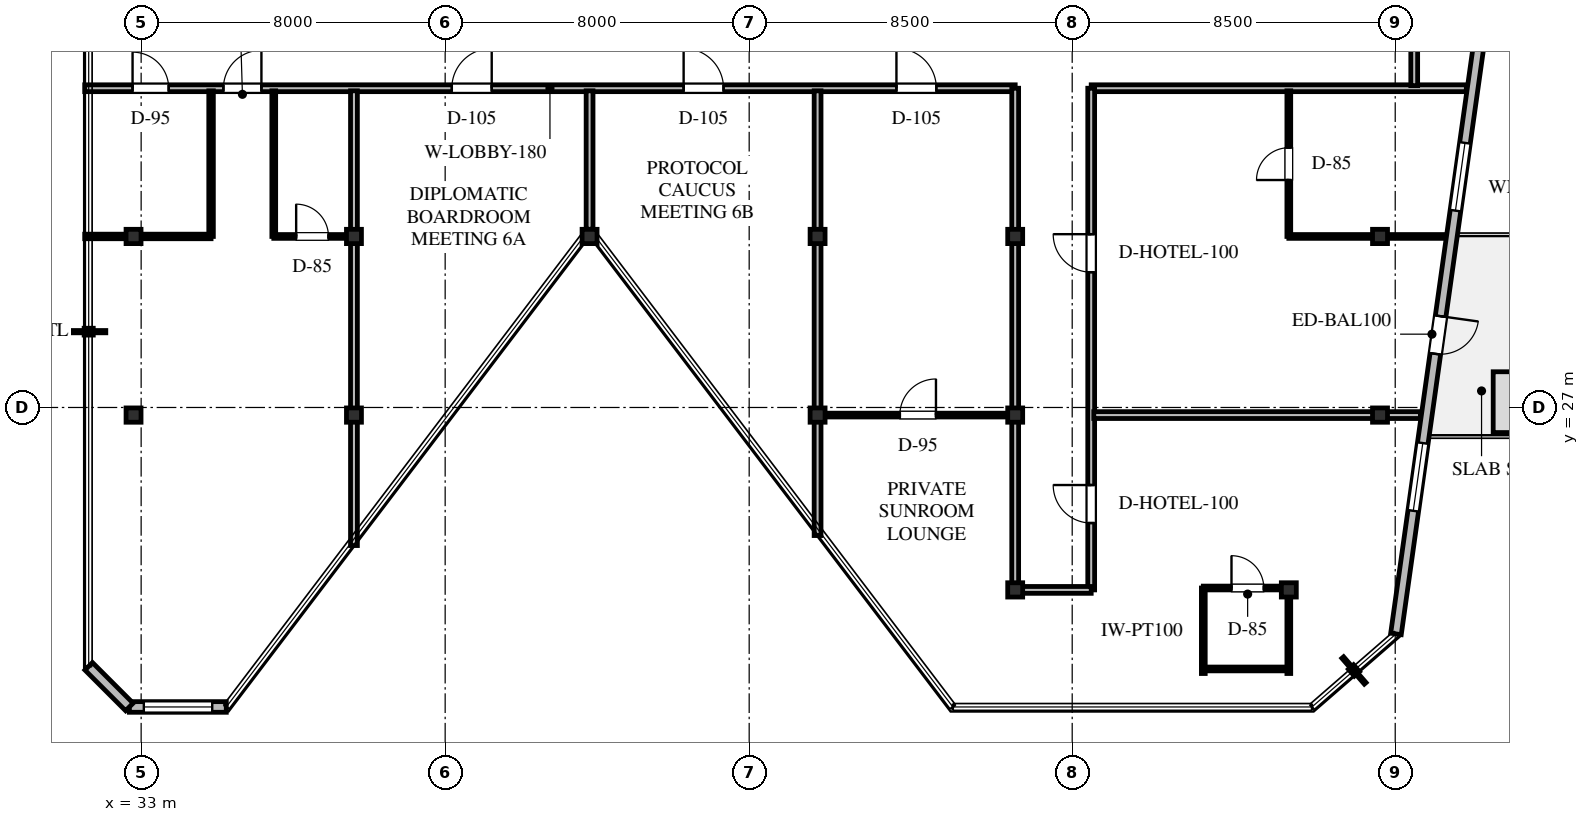
"""IFC4 building model, lengths in metres.
Left out: names, types, materials, properties, quantities, classifications, styles, units other than length and angle.
Written with IfcOpenShell. Run it as: python <this file> out.ifc"""

import sys

from ifc_helpers import new_model, si_unit, direction, frame, frame_2d, origin, origin_2d, place, context, subcontext, project, spatial, rectangle, i_section, extrude, element, fill, save


model = new_model("IFC4")
c1 = context("Model", 3, precision=1e-05, world=origin(), true_north=direction((0.0, 1.0)))
c2 = subcontext(c1, "Body", "Model", "MODEL_VIEW")
j1 = project(units=[si_unit("LENGTHUNIT", "METRE"), si_unit("PLANEANGLEUNIT", "RADIAN")], contexts=[c1])
p1 = place(None, origin())
s1 = spatial("IfcSite", under=j1, at=p1, CompositionType="ELEMENT")
p2 = place(p1, origin())
s2 = spatial("IfcBuilding", under=s1, at=p2, CompositionType="ELEMENT")
p3 = place(p2, frame((0.0, 0.0, 289.5)))
s3 = spatial("IfcBuildingStorey", under=s2, at=p3, CompositionType="ELEMENT", Elevation=289.5)
for number, where, z_axis, x_axis in (
    (1, (44.8, 31.5, 0.0), (0.0, 0.0, 1.0), (1.0, 0.0, 0.0)),
    (2, (50.8, 31.5, 0.0), (0.0, 0.0, 1.0), (1.0, 0.0, 0.0)),
    (3, (56.0, 31.5, 0.0), (0.0, 0.0, 1.0), (1.0, 0.0, 0.0)),
    (4, (65.6, 31.5, 0.0), (0.0, 0.0, 1.0), (1.0, 0.0, 0.0)),
    (5, (38.6, 31.5, 0.0), (0.0, 0.0, 1.0), (1.0, 0.0, 0.0)),
    (6, (32.8, 31.5, 0.0), (0.0, 0.0, 1.0), (1.0, 0.0, 0.0)),
    (7, (38.6, 26.8, 0.0), (0.0, 0.0, 1.0), (1.0, 0.0, 0.0)),
    (8, (50.8, 26.8, 0.0), (0.0, 0.0, 1.0), (1.0, 0.0, 0.0)),
    (9, (56.0, 26.8, 0.0), (0.0, 0.0, 1.0), (1.0, 0.0, 0.0)),
    (10, (65.6, 26.8, 0.0), (0.0, 0.0, 1.0), (1.0, 0.0, 0.0)),
    (11, (56.0, 22.2, 0.0), (0.0, 0.0, 1.0), (1.0, 0.0, 0.0)),
    (12, (63.2, 22.2, 0.0), (0.0, 0.0, 1.0), (1.0, 0.0, 0.0)),
    (13, (32.8, 26.8, 0.0), (0.0, 0.0, 1.0), (1.0, 0.0, 0.0)),
):
    element("IfcColumn", number, at=place(p3, frame(where, z_axis=z_axis, x_axis=x_axis)), inside=s3, PredefinedType="COLUMN", context=c2, shape_type="SweptSolid", body=[
        extrude(i_section(OverallWidth=0.394, OverallDepth=0.376, WebThickness=0.017, FlangeThickness=0.028, FilletRadius=0.03, at=origin_2d()), origin(), (0.0, 0.0, 1.0), 3.6),
    ])
p4 = place(p3, frame((68.375, 37.8, 0.0), z_axis=(0.0, 0.0, 1.0), x_axis=(-0.139171056495, -0.99026835607, 0.0)))
e14 = element("IfcWall", 14, at=p4, inside=s3, PredefinedType="STANDARD", context=c2, shape_type="SweptSolid", body=[
    extrude(rectangle(XDim=16.923, YDim=0.28, at=frame_2d((8.462, 0.0))), origin(), (0.0, 0.0, 1.0), 3.365),
])
p5 = place(p4, frame((8.481, 0.0, 0.0)))
e15 = element("IfcOpeningElement", 15, at=p5, cuts=e14, PredefinedType="OPENING", context=c2, shape_type="SweptSolid", body=[
    extrude(rectangle(XDim=1.0, YDim=2.15, at=frame_2d((0.5, 1.075))), frame((0.0, 0.15, 0.0), z_axis=(0.0, -1.0, 0.0), x_axis=(1.0, 0.0, 0.0)), (0.0, 0.0, 1.0), 0.3),
])
p6 = place(p4, frame((3.875, 0.0, 0.65)))
e16 = element("IfcOpeningElement", 16, at=p6, cuts=e14, PredefinedType="OPENING", context=c2, shape_type="SweptSolid", body=[
    extrude(rectangle(XDim=1.8, YDim=2.1, at=frame_2d((0.9, 1.05))), frame((0.0, 0.15, 0.0), z_axis=(0.0, -1.0, 0.0), x_axis=(1.0, 0.0, 0.0)), (0.0, 0.0, 1.0), 0.3),
])
p7 = place(p4, frame((11.852, 0.0, 0.65)))
e17 = element("IfcOpeningElement", 17, at=p7, cuts=e14, PredefinedType="OPENING", context=c2, shape_type="SweptSolid", body=[
    extrude(rectangle(XDim=1.8, YDim=2.1, at=frame_2d((0.9, 1.05))), frame((0.0, 0.15, 0.0), z_axis=(0.0, -1.0, 0.0), x_axis=(1.0, 0.0, 0.0)), (0.0, 0.0, 1.0), 0.3),
])
p8 = place(p3, frame((35.24, 19.12, 0.0), z_axis=(0.0, 0.0, 1.0), x_axis=(-1.0, 0.0, 0.0)))
e18 = element("IfcWall", 18, at=p8, inside=s3, PredefinedType="STANDARD", context=c2, shape_type="SweptSolid", body=[
    extrude(rectangle(XDim=2.551, YDim=0.28, at=frame_2d((1.275, 0.0))), origin(), (0.0, 0.0, 1.0), 3.365),
])
p9 = place(p8, frame((0.37, 0.0, 0.65)))
e19 = element("IfcOpeningElement", 19, at=p9, cuts=e18, PredefinedType="OPENING", context=c2, shape_type="SweptSolid", body=[
    extrude(rectangle(XDim=1.8, YDim=2.1, at=frame_2d((0.9, 1.05))), frame((0.0, 0.15, 0.0), z_axis=(0.0, -1.0, 0.0), x_axis=(1.0, 0.0, 0.0)), (0.0, 0.0, 1.0), 0.3),
])
p10 = place(p3, frame((32.69, 19.12, 0.0), z_axis=(0.0, 0.0, 1.0), x_axis=(-0.707106781187, 0.707106781187, 0.0)))
e20 = element("IfcWall", 20, at=p10, inside=s3, PredefinedType="STANDARD", context=c2, shape_type="SweptSolid", body=[
    extrude(rectangle(XDim=1.513, YDim=0.28, at=frame_2d((0.756, 0.0))), origin(), (0.0, 0.0, 1.0), 3.365),
])
p11 = place(p3, frame((31.515, 35.4, 0.0), z_axis=(0.0, 0.0, 1.0), x_axis=(1.0, 0.0, 0.0)))
e21 = element("IfcWall", 21, at=p11, inside=s3, PredefinedType="STANDARD", context=c2, shape_type="SweptSolid", body=[
    extrude(rectangle(XDim=24.485, YDim=0.18, at=frame_2d((12.243, 0.0))), origin(), (0.0, 0.0, 1.0), 2.754),
])
p12 = place(p11, frame((1.259, 0.0, 0.0)))
e22 = element("IfcOpeningElement", 22, at=p12, cuts=e21, PredefinedType="OPENING", context=c2, shape_type="SweptSolid", body=[
    extrude(rectangle(XDim=0.95, YDim=2.15, at=frame_2d((0.475, 1.075))), frame((0.0, 0.1, 0.0), z_axis=(0.0, -1.0, 0.0), x_axis=(1.0, 0.0, 0.0)), (0.0, 0.0, 1.0), 0.2),
])
p13 = place(p11, frame((3.65, 0.0, 0.0)))
e23 = element("IfcOpeningElement", 23, at=p13, cuts=e21, PredefinedType="OPENING", context=c2, shape_type="SweptSolid", body=[
    extrude(rectangle(XDim=1.0, YDim=2.15, at=frame_2d((0.5, 1.075))), frame((0.0, 0.1, 0.0), z_axis=(0.0, -1.0, 0.0), x_axis=(1.0, 0.0, 0.0)), (0.0, 0.0, 1.0), 0.2),
])
p14 = place(p11, frame((9.66, 0.0, 0.0)))
e24 = element("IfcOpeningElement", 24, at=p14, cuts=e21, PredefinedType="OPENING", context=c2, shape_type="SweptSolid", body=[
    extrude(rectangle(XDim=1.05, YDim=2.2, at=frame_2d((0.525, 1.1))), frame((0.0, 0.1, 0.0), z_axis=(0.0, -1.0, 0.0), x_axis=(1.0, 0.0, 0.0)), (0.0, 0.0, 1.0), 0.2),
])
p15 = place(p11, frame((15.76, 0.0, 0.0)))
e25 = element("IfcOpeningElement", 25, at=p15, cuts=e21, PredefinedType="OPENING", context=c2, shape_type="SweptSolid", body=[
    extrude(rectangle(XDim=1.05, YDim=2.2, at=frame_2d((0.525, 1.1))), frame((0.0, 0.1, 0.0), z_axis=(0.0, -1.0, 0.0), x_axis=(1.0, 0.0, 0.0)), (0.0, 0.0, 1.0), 0.2),
])
p16 = place(p11, frame((21.36, 0.0, 0.0)))
e26 = element("IfcOpeningElement", 26, at=p16, cuts=e21, PredefinedType="OPENING", context=c2, shape_type="SweptSolid", body=[
    extrude(rectangle(XDim=1.05, YDim=2.2, at=frame_2d((0.525, 1.1))), frame((0.0, 0.1, 0.0), z_axis=(0.0, -1.0, 0.0), x_axis=(1.0, 0.0, 0.0)), (0.0, 0.0, 1.0), 0.2),
])
p17 = place(p3, frame((58.0, 35.4, 0.0), z_axis=(0.0, 0.0, 1.0), x_axis=(1.0, 0.0, 0.0)))
e27 = element("IfcWall", 27, at=p17, inside=s3, PredefinedType="STANDARD", context=c2, shape_type="SweptSolid", body=[
    extrude(rectangle(XDim=9.871, YDim=0.18, at=frame_2d((4.936, 0.0))), origin(), (0.0, 0.0, 1.0), 3.365),
])
p18 = place(p3, frame((66.5, 35.468, 0.0), z_axis=(0.0, 0.0, 1.0), x_axis=(0.0, 1.0, 0.0)))
e28 = element("IfcWall", 28, at=p18, inside=s3, PredefinedType="STANDARD", context=c2, shape_type="SweptSolid", body=[
    extrude(rectangle(XDim=2.582, YDim=0.18, at=frame_2d((1.291, 0.0))), origin(), (0.0, 0.0, 1.0), 2.754),
])
p19 = place(p3, frame((56.0, 22.2, 0.0), z_axis=(0.0, 0.0, 1.0), x_axis=(0.0, 1.0, 0.0)))
e29 = element("IfcWall", 29, at=p19, inside=s3, PredefinedType="STANDARD", context=c2, shape_type="SweptSolid", body=[
    extrude(rectangle(XDim=13.2, YDim=0.18, at=frame_2d((6.6, 0.0))), origin(), (0.0, 0.0, 1.0), 2.754),
])
p20 = place(p3, frame((58.0, 22.2, 0.0), z_axis=(0.0, 0.0, 1.0), x_axis=(0.0, 1.0, 0.0)))
e30 = element("IfcWall", 30, at=p20, inside=s3, PredefinedType="STANDARD", context=c2, shape_type="SweptSolid", body=[
    extrude(rectangle(XDim=13.2, YDim=0.18, at=frame_2d((6.6, 0.0))), origin(), (0.0, 0.0, 1.0), 2.754),
])
p21 = place(p20, frame((1.76, 0.0, 0.0)))
e31 = element("IfcOpeningElement", 31, at=p21, cuts=e30, PredefinedType="OPENING", context=c2, shape_type="SweptSolid", body=[
    extrude(rectangle(XDim=1.0, YDim=2.15, at=frame_2d((0.5, 1.075))), frame((0.0, 0.1, 0.0), z_axis=(0.0, -1.0, 0.0), x_axis=(1.0, 0.0, 0.0)), (0.0, 0.0, 1.0), 0.2),
])
p22 = place(p20, frame((8.36, 0.0, 0.0)))
e32 = element("IfcOpeningElement", 32, at=p22, cuts=e30, PredefinedType="OPENING", context=c2, shape_type="SweptSolid", body=[
    extrude(rectangle(XDim=1.0, YDim=2.15, at=frame_2d((0.5, 1.075))), frame((0.0, 0.1, 0.0), z_axis=(0.0, -1.0, 0.0), x_axis=(1.0, 0.0, 0.0)), (0.0, 0.0, 1.0), 0.2),
])
p23 = place(p3, frame((56.0, 22.2, 0.0), z_axis=(0.0, 0.0, 1.0), x_axis=(1.0, 0.0, 0.0)))
e33 = element("IfcWall", 33, at=p23, inside=s3, PredefinedType="STANDARD", context=c2, shape_type="SweptSolid", body=[
    extrude(rectangle(XDim=2.0, YDim=0.18, at=frame_2d((1.0, 0.0))), origin(), (0.0, 0.0, 1.0), 2.754),
])
p24 = place(p3, frame((34.84, 31.5, 0.0), z_axis=(0.0, 0.0, 1.0), x_axis=(0.0, 1.0, 0.0)))
e34 = element("IfcWall", 34, at=p24, inside=s3, PredefinedType="PARTITIONING", context=c2, shape_type="SweptSolid", body=[
    extrude(rectangle(XDim=3.832, YDim=0.12, at=frame_2d((1.916, 0.0))), origin(), (0.0, 0.0, 1.0), 2.754),
])
p25 = place(p3, frame((31.515, 31.5, 0.0), z_axis=(0.0, 0.0, 1.0), x_axis=(1.0, 0.0, 0.0)))
e35 = element("IfcWall", 35, at=p25, inside=s3, PredefinedType="PARTITIONING", context=c2, shape_type="SweptSolid", body=[
    extrude(rectangle(XDim=3.325, YDim=0.12, at=frame_2d((1.663, 0.0))), origin(), (0.0, 0.0, 1.0), 2.754),
])
p26 = place(p3, frame((58.068, 26.8, 0.0), z_axis=(0.0, 0.0, 1.0), x_axis=(1.0, 0.0, 0.0)))
e36 = element("IfcWall", 36, at=p26, inside=s3, PredefinedType="STANDARD", context=c2, shape_type="SweptSolid", body=[
    extrude(rectangle(XDim=8.594, YDim=0.18, at=frame_2d((4.297, 0.0))), origin(), (0.0, 0.0, 1.0), 2.754),
])
p27 = place(p3, frame((60.95, 22.25, 0.0), z_axis=(0.0, 0.0, 1.0), x_axis=(1.0, 0.0, 0.0)))
e37 = element("IfcWall", 37, at=p27, inside=s3, PredefinedType="PARTITIONING", context=c2, shape_type="SweptSolid", body=[
    extrude(rectangle(XDim=2.25, YDim=0.1, at=frame_2d((1.125, 0.0))), origin(), (0.0, 0.0, 1.0), 2.754),
])
p28 = place(p27, frame((0.741, 0.0, 0.0)))
e38 = element("IfcOpeningElement", 38, at=p28, cuts=e37, PredefinedType="OPENING", context=c2, shape_type="SweptSolid", body=[
    extrude(rectangle(XDim=0.85, YDim=2.1, at=frame_2d((0.425, 1.05))), frame((0.0, 0.06, 0.0), z_axis=(0.0, -1.0, 0.0), x_axis=(1.0, 0.0, 0.0)), (0.0, 0.0, 1.0), 0.12),
])
for number, where, z_axis, x_axis in (
    (39, (60.95, 20.0, 0.0), (0.0, 0.0, 1.0), (0.0, 1.0, 0.0)),
    (40, (63.2, 20.0, 0.0), (0.0, 0.0, 1.0), (0.0, 1.0, 0.0)),
):
    element("IfcWall", number, at=place(p3, frame(where, z_axis=z_axis, x_axis=x_axis)), inside=s3, PredefinedType="PARTITIONING", context=c2, shape_type="SweptSolid", body=[
        extrude(rectangle(XDim=2.25, YDim=0.1, at=frame_2d((1.125, 0.0))), origin(), (0.0, 0.0, 1.0), 2.754),
    ])
p29 = place(p3, frame((61.018, 20.12, 0.0), z_axis=(0.0, 0.0, 1.0), x_axis=(1.0, 0.0, 0.0)))
e41 = element("IfcWall", 41, at=p29, inside=s3, PredefinedType="PARTITIONING", context=c2, shape_type="SweptSolid", body=[
    extrude(rectangle(XDim=2.114, YDim=0.1, at=frame_2d((1.057, 0.0))), origin(), (0.0, 0.0, 1.0), 3.365),
])
p30 = place(p3, frame((63.2, 31.5, 0.0), z_axis=(0.0, 0.0, 1.0), x_axis=(1.0, 0.0, 0.0)))
e42 = element("IfcWall", 42, at=p30, inside=s3, PredefinedType="PARTITIONING", context=c2, shape_type="SweptSolid", body=[
    extrude(rectangle(XDim=4.123, YDim=0.1, at=frame_2d((2.062, 0.0))), origin(), (0.0, 0.0, 1.0), 2.754),
])
p31 = place(p3, frame((63.2, 31.5, 0.0), z_axis=(0.0, 0.0, 1.0), x_axis=(0.0, 1.0, 0.0)))
e43 = element("IfcWall", 43, at=p31, inside=s3, PredefinedType="PARTITIONING", context=c2, shape_type="SweptSolid", body=[
    extrude(rectangle(XDim=3.832, YDim=0.1, at=frame_2d((1.916, 0.0))), origin(), (0.0, 0.0, 1.0), 2.754),
])
p32 = place(p31, frame((1.485, 0.0, 0.0)))
e44 = element("IfcOpeningElement", 44, at=p32, cuts=e43, PredefinedType="OPENING", context=c2, shape_type="SweptSolid", body=[
    extrude(rectangle(XDim=0.85, YDim=2.1, at=frame_2d((0.425, 1.05))), frame((0.0, 0.06, 0.0), z_axis=(0.0, -1.0, 0.0), x_axis=(1.0, 0.0, 0.0)), (0.0, 0.0, 1.0), 0.12),
])
p33 = place(p3, frame((36.49, 31.5, 0.0), z_axis=(0.0, 0.0, 1.0), x_axis=(0.0, 1.0, 0.0)))
e45 = element("IfcWall", 45, at=p33, inside=s3, PredefinedType="PARTITIONING", context=c2, shape_type="SweptSolid", body=[
    extrude(rectangle(XDim=3.832, YDim=0.1, at=frame_2d((1.916, 0.0))), origin(), (0.0, 0.0, 1.0), 2.754),
])
p34 = place(p3, frame((36.49, 31.5, 0.0), z_axis=(0.0, 0.0, 1.0), x_axis=(1.0, 0.0, 0.0)))
e46 = element("IfcWall", 46, at=p34, inside=s3, PredefinedType="PARTITIONING", context=c2, shape_type="SweptSolid", body=[
    extrude(rectangle(XDim=2.042, YDim=0.1, at=frame_2d((1.021, 0.0))), origin(), (0.0, 0.0, 1.0), 2.754),
])
p35 = place(p34, frame((0.589, 0.0, 0.0)))
e47 = element("IfcOpeningElement", 47, at=p35, cuts=e46, PredefinedType="OPENING", context=c2, shape_type="SweptSolid", body=[
    extrude(rectangle(XDim=0.85, YDim=2.1, at=frame_2d((0.425, 1.05))), frame((0.0, 0.06, 0.0), z_axis=(0.0, -1.0, 0.0), x_axis=(1.0, 0.0, 0.0)), (0.0, 0.0, 1.0), 0.12),
])
p36 = place(p3, frame((38.6, 23.367, 0.0), z_axis=(0.0, 0.0, 1.0), x_axis=(0.0, 1.0, 0.0)))
e48 = element("IfcWall", 48, at=p36, inside=s3, PredefinedType="STANDARD", context=c2, shape_type="SweptSolid", body=[
    extrude(rectangle(XDim=11.965, YDim=0.18, at=frame_2d((5.982, 0.0))), origin(), (0.0, 0.0, 1.0), 2.754),
])
p37 = place(p3, frame((44.8, 31.525, 0.0), z_axis=(0.0, 0.0, 1.0), x_axis=(0.0, 1.0, 0.0)))
e49 = element("IfcWall", 49, at=p37, inside=s3, PredefinedType="STANDARD", context=c2, shape_type="SweptSolid", body=[
    extrude(rectangle(XDim=3.807, YDim=0.18, at=frame_2d((1.904, 0.0))), origin(), (0.0, 0.0, 1.0), 2.754),
])
p38 = place(p3, frame((50.8, 23.63, 0.0), z_axis=(0.0, 0.0, 1.0), x_axis=(0.0, 1.0, 0.0)))
e50 = element("IfcWall", 50, at=p38, inside=s3, PredefinedType="STANDARD", context=c2, shape_type="SweptSolid", body=[
    extrude(rectangle(XDim=11.702, YDim=0.18, at=frame_2d((5.851, 0.0))), origin(), (0.0, 0.0, 1.0), 2.754),
])
p39 = place(p3, frame((50.868, 26.8, 0.0), z_axis=(0.0, 0.0, 1.0), x_axis=(1.0, 0.0, 0.0)))
e51 = element("IfcWall", 51, at=p39, inside=s3, PredefinedType="PARTITIONING", context=c2, shape_type="SweptSolid", body=[
    extrude(rectangle(XDim=5.064, YDim=0.1, at=frame_2d((2.532, 0.0))), origin(), (0.0, 0.0, 1.0), 2.754),
])
p40 = place(p39, frame((2.097, 0.0, 0.0)))
e52 = element("IfcOpeningElement", 52, at=p40, cuts=e51, PredefinedType="OPENING", context=c2, shape_type="SweptSolid", body=[
    extrude(rectangle(XDim=0.95, YDim=2.15, at=frame_2d((0.475, 1.075))), frame((0.0, 0.06, 0.0), z_axis=(0.0, -1.0, 0.0), x_axis=(1.0, 0.0, 0.0)), (0.0, 0.0, 1.0), 0.12),
])
p41 = place(p5, origin())
e53 = element("IfcDoor", 53, at=p41, inside=s3, OperationType="SINGLE_SWING_LEFT", PredefinedType="DOOR", context=c2, shape_type="SweptSolid", body=[
    extrude(rectangle(XDim=1.0, YDim=2.15, at=frame_2d((0.5, 1.075))), frame((0.0, 0.025, 0.0), z_axis=(0.0, -1.0, 0.0), x_axis=(1.0, 0.0, 0.0)), (0.0, 0.0, 1.0), 0.05),
])
fill(e15, e53)
p42 = place(p6, origin())
e54 = element("IfcWindow", 54, at=p42, inside=s3, PartitioningType="SINGLE_PANEL", PredefinedType="WINDOW", context=c2, shape_type="SweptSolid", body=[
    extrude(rectangle(XDim=1.8, YDim=2.1, at=frame_2d((0.9, 1.05))), frame((0.0, 0.03, 0.0), z_axis=(0.0, -1.0, 0.0), x_axis=(1.0, 0.0, 0.0)), (0.0, 0.0, 1.0), 0.06),
])
fill(e16, e54)
p43 = place(p7, origin())
e55 = element("IfcWindow", 55, at=p43, inside=s3, PartitioningType="SINGLE_PANEL", PredefinedType="WINDOW", context=c2, shape_type="SweptSolid", body=[
    extrude(rectangle(XDim=1.8, YDim=2.1, at=frame_2d((0.9, 1.05))), frame((0.0, 0.03, 0.0), z_axis=(0.0, -1.0, 0.0), x_axis=(1.0, 0.0, 0.0)), (0.0, 0.0, 1.0), 0.06),
])
fill(e17, e55)
p44 = place(p9, origin())
e56 = element("IfcWindow", 56, at=p44, inside=s3, PartitioningType="SINGLE_PANEL", PredefinedType="WINDOW", context=c2, shape_type="SweptSolid", body=[
    extrude(rectangle(XDim=1.8, YDim=2.1, at=frame_2d((0.9, 1.05))), frame((0.0, 0.03, 0.0), z_axis=(0.0, -1.0, 0.0), x_axis=(1.0, 0.0, 0.0)), (0.0, 0.0, 1.0), 0.06),
])
fill(e19, e56)
p45 = place(p12, origin())
e57 = element("IfcDoor", 57, at=p45, inside=s3, OperationType="SINGLE_SWING_LEFT", PredefinedType="DOOR", context=c2, shape_type="SweptSolid", body=[
    extrude(rectangle(XDim=0.95, YDim=2.15, at=frame_2d((0.475, 1.075))), frame((0.0, 0.025, 0.0), z_axis=(0.0, -1.0, 0.0), x_axis=(1.0, 0.0, 0.0)), (0.0, 0.0, 1.0), 0.05),
])
fill(e22, e57)
p46 = place(p21, origin())
e58 = element("IfcDoor", 58, at=p46, inside=s3, OperationType="SINGLE_SWING_RIGHT", PredefinedType="DOOR", context=c2, shape_type="SweptSolid", body=[
    extrude(rectangle(XDim=1.0, YDim=2.15, at=frame_2d((0.5, 1.075))), frame((0.0, 0.025, 0.0), z_axis=(0.0, -1.0, 0.0), x_axis=(1.0, 0.0, 0.0)), (0.0, 0.0, 1.0), 0.05),
])
fill(e31, e58)
p47 = place(p28, origin())
e59 = element("IfcDoor", 59, at=p47, inside=s3, OperationType="SINGLE_SWING_LEFT", PredefinedType="DOOR", context=c2, shape_type="SweptSolid", body=[
    extrude(rectangle(XDim=0.85, YDim=2.1, at=frame_2d((0.425, 1.05))), frame((0.0, 0.025, 0.0), z_axis=(0.0, -1.0, 0.0), x_axis=(1.0, 0.0, 0.0)), (0.0, 0.0, 1.0), 0.05),
])
fill(e38, e59)
p48 = place(p22, origin())
e60 = element("IfcDoor", 60, at=p48, inside=s3, OperationType="SINGLE_SWING_RIGHT", PredefinedType="DOOR", context=c2, shape_type="SweptSolid", body=[
    extrude(rectangle(XDim=1.0, YDim=2.15, at=frame_2d((0.5, 1.075))), frame((0.0, 0.025, 0.0), z_axis=(0.0, -1.0, 0.0), x_axis=(1.0, 0.0, 0.0)), (0.0, 0.0, 1.0), 0.05),
])
fill(e32, e60)
p49 = place(p32, origin())
e61 = element("IfcDoor", 61, at=p49, inside=s3, OperationType="SINGLE_SWING_LEFT", PredefinedType="DOOR", context=c2, shape_type="SweptSolid", body=[
    extrude(rectangle(XDim=0.85, YDim=2.1, at=frame_2d((0.425, 1.05))), frame((0.0, 0.025, 0.0), z_axis=(0.0, -1.0, 0.0), x_axis=(1.0, 0.0, 0.0)), (0.0, 0.0, 1.0), 0.05),
])
fill(e44, e61)
p50 = place(p13, origin())
e62 = element("IfcDoor", 62, at=p50, inside=s3, OperationType="SINGLE_SWING_RIGHT", PredefinedType="DOOR", context=c2, shape_type="SweptSolid", body=[
    extrude(rectangle(XDim=1.0, YDim=2.15, at=frame_2d((0.5, 1.075))), frame((0.0, 0.025, 0.0), z_axis=(0.0, -1.0, 0.0), x_axis=(1.0, 0.0, 0.0)), (0.0, 0.0, 1.0), 0.05),
])
fill(e23, e62)
p51 = place(p35, origin())
e63 = element("IfcDoor", 63, at=p51, inside=s3, OperationType="SINGLE_SWING_LEFT", PredefinedType="DOOR", context=c2, shape_type="SweptSolid", body=[
    extrude(rectangle(XDim=0.85, YDim=2.1, at=frame_2d((0.425, 1.05))), frame((0.0, 0.025, 0.0), z_axis=(0.0, -1.0, 0.0), x_axis=(1.0, 0.0, 0.0)), (0.0, 0.0, 1.0), 0.05),
])
fill(e47, e63)
p52 = place(p14, origin())
e64 = element("IfcDoor", 64, at=p52, inside=s3, OperationType="SINGLE_SWING_RIGHT", PredefinedType="DOOR", context=c2, shape_type="SweptSolid", body=[
    extrude(rectangle(XDim=1.05, YDim=2.2, at=frame_2d((0.525, 1.1))), frame((0.0, 0.025, 0.0), z_axis=(0.0, -1.0, 0.0), x_axis=(1.0, 0.0, 0.0)), (0.0, 0.0, 1.0), 0.05),
])
fill(e24, e64)
p53 = place(p15, origin())
e65 = element("IfcDoor", 65, at=p53, inside=s3, OperationType="SINGLE_SWING_LEFT", PredefinedType="DOOR", context=c2, shape_type="SweptSolid", body=[
    extrude(rectangle(XDim=1.05, YDim=2.2, at=frame_2d((0.525, 1.1))), frame((0.0, 0.025, 0.0), z_axis=(0.0, -1.0, 0.0), x_axis=(1.0, 0.0, 0.0)), (0.0, 0.0, 1.0), 0.05),
])
fill(e25, e65)
p54 = place(p40, origin())
e66 = element("IfcDoor", 66, at=p54, inside=s3, OperationType="SINGLE_SWING_RIGHT", PredefinedType="DOOR", context=c2, shape_type="SweptSolid", body=[
    extrude(rectangle(XDim=0.95, YDim=2.15, at=frame_2d((0.475, 1.075))), frame((0.0, 0.025, 0.0), z_axis=(0.0, -1.0, 0.0), x_axis=(1.0, 0.0, 0.0)), (0.0, 0.0, 1.0), 0.05),
])
fill(e52, e66)
p55 = place(p16, origin())
e67 = element("IfcDoor", 67, at=p55, inside=s3, OperationType="SINGLE_SWING_LEFT", PredefinedType="DOOR", context=c2, shape_type="SweptSolid", body=[
    extrude(rectangle(XDim=1.05, YDim=2.2, at=frame_2d((0.525, 1.1))), frame((0.0, 0.025, 0.0), z_axis=(0.0, -1.0, 0.0), x_axis=(1.0, 0.0, 0.0)), (0.0, 0.0, 1.0), 0.05),
])
fill(e26, e67)
save(model, sys.argv[1])
